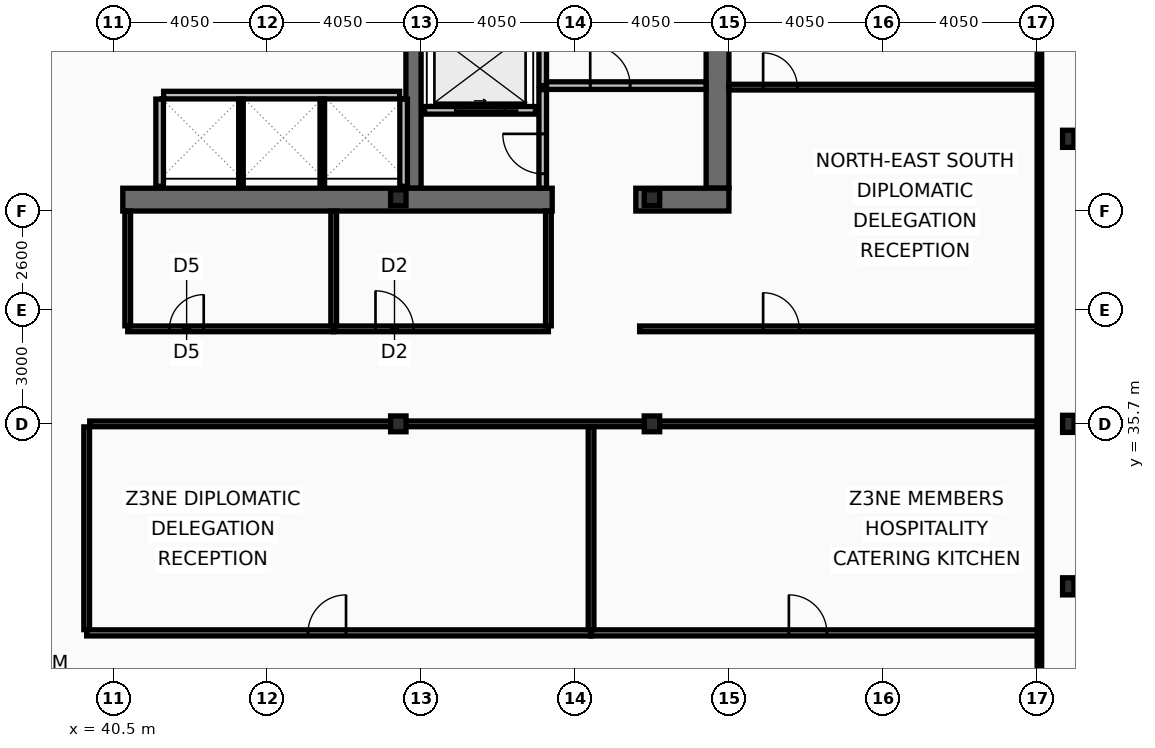
"""IFC4 building model, lengths in metres.
Left out: names, types, materials, properties, quantities, classifications, styles, units other than length and angle.
Written with IfcOpenShell. Run it as: python <this file> out.ifc"""

import sys

from ifc_helpers import new_model, si_unit, direction, frame, frame_2d, origin, origin_2d, place, context, subcontext, project, spatial, rectangle, i_section, extrude, element, fill, save


model = new_model("IFC4")
c1 = context("Model", 3, precision=1e-05, world=origin(), true_north=direction((0.0, 1.0)))
c2 = subcontext(c1, "Body", "Model", "MODEL_VIEW")
j1 = project(units=[si_unit("LENGTHUNIT", "METRE"), si_unit("PLANEANGLEUNIT", "RADIAN")], contexts=[c1])
p1 = place(None, origin())
s1 = spatial("IfcSite", under=j1, at=p1, CompositionType="ELEMENT")
p2 = place(p1, origin())
s2 = spatial("IfcBuilding", under=s1, at=p2, CompositionType="ELEMENT")
p3 = place(p2, frame((0.0, 0.0, 206.6)))
s3 = spatial("IfcBuildingStorey", under=s2, at=p3, CompositionType="ELEMENT", Elevation=206.6)
p4 = place(p3, frame((56.4, 53.1, 0.0), z_axis=(0.0, 0.0, 1.0), x_axis=(0.0, -1.0, 0.0)))
e1 = element("IfcWall", 1, at=p4, inside=s3, PredefinedType="SHEAR", context=c2, shape_type="SweptSolid", body=[
    extrude(rectangle(XDim=11.2, YDim=0.6, at=frame_2d((5.6, 0.0))), origin(), (0.0, 0.0, 1.0), 3.44),
])
p5 = place(p3, frame((48.4, 41.9, 0.0), z_axis=(0.0, 0.0, 1.0), x_axis=(0.0, 1.0, 0.0)))
e2 = element("IfcWall", 2, at=p5, inside=s3, PredefinedType="SHEAR", context=c2, shape_type="SweptSolid", body=[
    extrude(rectangle(XDim=11.2, YDim=0.4, at=frame_2d((5.6, 0.0))), origin(), (0.0, 0.0, 1.0), 3.44),
])
p6 = place(p3, frame((52.05, 41.6, 0.0), z_axis=(0.0, 0.0, 1.0), x_axis=(-1.0, 0.0, 0.0)))
e3 = element("IfcWall", 3, at=p6, inside=s3, PredefinedType="SHEAR", context=c2, shape_type="SweptSolid", body=[
    extrude(rectangle(XDim=11.3, YDim=0.6, at=frame_2d((5.65, 0.0))), origin(), (0.0, 0.0, 1.0), 3.44),
])
p7 = place(p3, frame((56.7, 41.6, 0.0), z_axis=(0.0, 0.0, 1.0), x_axis=(-1.0, 0.0, 0.0)))
e4 = element("IfcWall", 4, at=p7, inside=s3, PredefinedType="SHEAR", context=c2, shape_type="SweptSolid", body=[
    extrude(rectangle(XDim=2.45, YDim=0.6, at=frame_2d((1.225, 0.0))), origin(), (0.0, 0.0, 1.0), 3.44),
])
for number, where, z_axis, x_axis in (
    (5, (65.63, 31.425, 0.0), (0.0, 0.0, 1.0), (1.0, 0.0, 0.0)),
    (6, (65.63, 35.7, 0.0), (0.0, 0.0, 1.0), (1.0, 0.0, 0.0)),
    (7, (65.63, 43.2, 0.0), (0.0, 0.0, 1.0), (1.0, 0.0, 0.0)),
):
    element("IfcColumn", number, at=place(p3, frame(where, z_axis=z_axis, x_axis=x_axis)), inside=s3, PredefinedType="COLUMN", context=c2, shape_type="SweptSolid", body=[
        extrude(i_section(OverallWidth=0.3, OverallDepth=0.45, WebThickness=0.014, FlangeThickness=0.026, at=origin_2d()), origin(), (0.0, 0.0, 1.0), 3.6),
    ])
for number, where, z_axis, x_axis in (
    (8, (48.0, 35.7, 0.0), (0.0, 0.0, 1.0), (1.0, 0.0, 0.0)),
    (9, (48.0, 41.65, 0.0), (0.0, 0.0, 1.0), (1.0, 0.0, 0.0)),
    (10, (54.675, 35.7, 0.0), (0.0, 0.0, 1.0), (1.0, 0.0, 0.0)),
    (11, (54.675, 41.65, 0.0), (0.0, 0.0, 1.0), (1.0, 0.0, 0.0)),
):
    element("IfcColumn", number, at=place(p3, frame(where, z_axis=z_axis, x_axis=x_axis)), inside=s3, PredefinedType="COLUMN", context=c2, shape_type="SweptSolid", body=[
        extrude(i_section(OverallWidth=0.406, OverallDepth=0.416, WebThickness=0.03, FlangeThickness=0.048, at=origin_2d()), origin(), (0.0, 0.0, 1.0), 3.6),
    ])
p8 = place(p3, frame((51.61, 43.95, 0.0), z_axis=(0.0, 0.0, 1.0), x_axis=(-1.0, 0.0, 0.0)))
e12 = element("IfcWall", 12, at=p8, inside=s3, PredefinedType="PARTITIONING", context=c2, shape_type="SweptSolid", body=[
    extrude(rectangle(XDim=2.92, YDim=0.2, at=frame_2d((1.46, 0.0))), origin(), (0.0, 0.0, 1.0), 3.44),
])
p9 = place(p8, frame((0.81, 0.0, 0.0)))
e13 = element("IfcOpeningElement", 13, at=p9, cuts=e12, PredefinedType="OPENING", context=c2, shape_type="SweptSolid", body=[
    extrude(rectangle(XDim=1.3, YDim=2.18, at=frame_2d((0.65, 1.09))), frame((0.0, 0.11, 0.0), z_axis=(0.0, -1.0, 0.0), x_axis=(1.0, 0.0, 0.0)), (0.0, 0.0, 1.0), 0.22),
])
p10 = place(p3, frame((51.8, 44.6, 0.0), z_axis=(0.0, 0.0, 1.0), x_axis=(0.0, 1.0, 0.0)))
e14 = element("IfcWall", 14, at=p10, inside=s3, PredefinedType="PARTITIONING", context=c2, shape_type="SweptSolid", body=[
    extrude(rectangle(XDim=4.3, YDim=0.2, at=frame_2d((2.15, 0.0))), origin(), (0.0, 0.0, 1.0), 3.44),
])
p11 = place(p3, frame((51.9, 44.6, 0.0), z_axis=(0.0, 0.0, 1.0), x_axis=(1.0, 0.0, 0.0)))
e15 = element("IfcWall", 15, at=p11, inside=s3, PredefinedType="PARTITIONING", context=c2, shape_type="SweptSolid", body=[
    extrude(rectangle(XDim=4.2, YDim=0.2, at=frame_2d((2.1, 0.0))), origin(), (0.0, 0.0, 1.0), 3.44),
])
p12 = place(p11, frame((1.15, 0.0, 0.0)))
e16 = element("IfcOpeningElement", 16, at=p12, cuts=e15, PredefinedType="OPENING", context=c2, shape_type="SweptSolid", body=[
    extrude(rectangle(XDim=1.05, YDim=2.15, at=frame_2d((0.525, 1.075))), frame((0.0, 0.11, 0.0), z_axis=(0.0, -1.0, 0.0), x_axis=(1.0, 0.0, 0.0)), (0.0, 0.0, 1.0), 0.22),
])
p13 = place(p3, frame((51.8, 41.9, 0.0), z_axis=(0.0, 0.0, 1.0), x_axis=(0.0, 1.0, 0.0)))
e17 = element("IfcWall", 17, at=p13, inside=s3, PredefinedType="PARTITIONING", context=c2, shape_type="SweptSolid", body=[
    extrude(rectangle(XDim=2.595, YDim=0.2, at=frame_2d((1.298, 0.0))), origin(), (0.0, 0.0, 1.0), 3.44),
])
p14 = place(p13, frame((0.38, 0.0, 0.0)))
e18 = element("IfcOpeningElement", 18, at=p14, cuts=e17, PredefinedType="OPENING", context=c2, shape_type="SweptSolid", body=[
    extrude(rectangle(XDim=1.05, YDim=2.15, at=frame_2d((0.525, 1.075))), frame((0.0, 0.11, 0.0), z_axis=(0.0, -1.0, 0.0), x_axis=(1.0, 0.0, 0.0)), (0.0, 0.0, 1.0), 0.22),
])
p15 = place(p3, frame((41.825, 44.35, 0.0), z_axis=(0.0, 0.0, 1.0), x_axis=(1.0, 0.0, 0.0)))
e19 = element("IfcWall", 19, at=p15, inside=s3, PredefinedType="PARTITIONING", context=c2, shape_type="SweptSolid", body=[
    extrude(rectangle(XDim=6.21, YDim=0.2, at=frame_2d((3.105, 0.0))), origin(), (0.0, 0.0, 1.0), 3.44),
])
for number, where, z_axis, x_axis in (
    (20, (41.72, 41.95, 0.0), (0.0, 0.0, 1.0), (0.0, 1.0, 0.0)),
    (21, (48.14, 41.95, 0.0), (0.0, 0.0, 1.0), (0.0, 1.0, 0.0)),
):
    element("IfcWall", number, at=place(p3, frame(where, z_axis=z_axis, x_axis=x_axis)), inside=s3, PredefinedType="PARTITIONING", context=c2, shape_type="SweptSolid", body=[
        extrude(rectangle(XDim=2.295, YDim=0.2, at=frame_2d((1.147, 0.0))), origin(), (0.0, 0.0, 1.0), 3.44),
    ])
for number, where, z_axis, x_axis in (
    (22, (43.86, 41.95, 0.0), (0.0, 0.0, 1.0), (0.0, 1.0, 0.0)),
    (23, (46.0, 41.95, 0.0), (0.0, 0.0, 1.0), (0.0, 1.0, 0.0)),
):
    element("IfcWall", number, at=place(p3, frame(where, z_axis=z_axis, x_axis=x_axis)), inside=s3, PredefinedType="PARTITIONING", context=c2, shape_type="SweptSolid", body=[
        extrude(rectangle(XDim=2.295, YDim=0.12, at=frame_2d((1.147, 0.0))), origin(), (0.0, 0.0, 1.0), 3.44),
    ])
p16 = place(p3, frame((40.88, 38.2, 0.0), z_axis=(0.0, 0.0, 1.0), x_axis=(1.0, 0.0, 0.0)))
e24 = element("IfcWall", 24, at=p16, inside=s3, PredefinedType="PARTITIONING", context=c2, shape_type="SweptSolid", body=[
    extrude(rectangle(XDim=5.42, YDim=0.15, at=frame_2d((2.71, 0.0))), origin(), (0.0, 0.0, 1.0), 2.73),
])
p17 = place(p16, frame((1.1, 0.0, 0.0)))
e25 = element("IfcOpeningElement", 25, at=p17, cuts=e24, PredefinedType="OPENING", context=c2, shape_type="SweptSolid", body=[
    extrude(rectangle(XDim=0.9, YDim=2.05, at=frame_2d((0.45, 1.025))), frame((0.0, 0.085, 0.0), z_axis=(0.0, -1.0, 0.0), x_axis=(1.0, 0.0, 0.0)), (0.0, 0.0, 1.0), 0.17),
])
p18 = place(p3, frame((46.3, 38.2, 0.0), z_axis=(0.0, 0.0, 1.0), x_axis=(1.0, 0.0, 0.0)))
e26 = element("IfcWall", 26, at=p18, inside=s3, PredefinedType="PARTITIONING", context=c2, shape_type="SweptSolid", body=[
    extrude(rectangle(XDim=5.65, YDim=0.15, at=frame_2d((2.825, 0.0))), origin(), (0.0, 0.0, 1.0), 2.73),
])
p19 = place(p18, frame((1.1, 0.0, 0.0)))
e27 = element("IfcOpeningElement", 27, at=p19, cuts=e26, PredefinedType="OPENING", context=c2, shape_type="SweptSolid", body=[
    extrude(rectangle(XDim=1.0, YDim=2.05, at=frame_2d((0.5, 1.025))), frame((0.0, 0.085, 0.0), z_axis=(0.0, -1.0, 0.0), x_axis=(1.0, 0.0, 0.0)), (0.0, 0.0, 1.0), 0.17),
])
for number, where, z_axis, x_axis in (
    (28, (40.88, 38.28, 0.0), (0.0, 0.0, 1.0), (0.0, 1.0, 0.0)),
    (29, (46.3, 38.28, 0.0), (0.0, 0.0, 1.0), (0.0, 1.0, 0.0)),
    (30, (51.95, 38.28, 0.0), (0.0, 0.0, 1.0), (0.0, 1.0, 0.0)),
):
    element("IfcWall", number, at=place(p3, frame(where, z_axis=z_axis, x_axis=x_axis)), inside=s3, PredefinedType="PARTITIONING", context=c2, shape_type="SweptSolid", body=[
        extrude(rectangle(XDim=3.02, YDim=0.15, at=frame_2d((1.51, 0.0))), origin(), (0.0, 0.0, 1.0), 3.44),
    ])
p20 = place(p3, frame((54.35, 38.2, 0.0), z_axis=(0.0, 0.0, 1.0), x_axis=(1.0, 0.0, 0.0)))
e31 = element("IfcWall", 31, at=p20, inside=s3, PredefinedType="PARTITIONING", context=c2, shape_type="SweptSolid", body=[
    extrude(rectangle(XDim=10.52, YDim=0.15, at=frame_2d((5.26, 0.0))), origin(), (0.0, 0.0, 1.0), 2.73),
])
p21 = place(p20, frame((3.25, 0.0, 0.0)))
e32 = element("IfcOpeningElement", 32, at=p21, cuts=e31, PredefinedType="OPENING", context=c2, shape_type="SweptSolid", body=[
    extrude(rectangle(XDim=0.95, YDim=2.05, at=frame_2d((0.475, 1.025))), frame((0.0, 0.085, 0.0), z_axis=(0.0, -1.0, 0.0), x_axis=(1.0, 0.0, 0.0)), (0.0, 0.0, 1.0), 0.17),
])
p22 = place(p3, frame((56.7, 44.56, 0.0), z_axis=(0.0, 0.0, 1.0), x_axis=(1.0, 0.0, 0.0)))
e33 = element("IfcWall", 33, at=p22, inside=s3, PredefinedType="PARTITIONING", context=c2, shape_type="SweptSolid", body=[
    extrude(rectangle(XDim=8.105, YDim=0.15, at=frame_2d((4.052, 0.0))), origin(), (0.0, 0.0, 1.0), 2.83),
])
p23 = place(p22, frame((0.9, 0.0, 0.0)))
e34 = element("IfcOpeningElement", 34, at=p23, cuts=e33, PredefinedType="OPENING", context=c2, shape_type="SweptSolid", body=[
    extrude(rectangle(XDim=0.9, YDim=2.05, at=frame_2d((0.45, 1.025))), frame((0.0, 0.085, 0.0), z_axis=(0.0, -1.0, 0.0), x_axis=(1.0, 0.0, 0.0)), (0.0, 0.0, 1.0), 0.17),
])
p24 = place(p3, frame((39.8, 30.285, 0.0), z_axis=(0.0, 0.0, 1.0), x_axis=(0.0, 1.0, 0.0)))
e35 = element("IfcWall", 35, at=p24, inside=s3, PredefinedType="PARTITIONING", context=c2, shape_type="SweptSolid", body=[
    extrude(rectangle(XDim=5.335, YDim=0.15, at=frame_2d((2.667, 0.0))), origin(), (0.0, 0.0, 1.0), 2.98),
])
p25 = place(p3, frame((39.88, 35.7, 0.0), z_axis=(0.0, 0.0, 1.0), x_axis=(1.0, 0.0, 0.0)))
e36 = element("IfcWall", 36, at=p25, inside=s3, PredefinedType="PARTITIONING", context=c2, shape_type="SweptSolid", body=[
    extrude(rectangle(XDim=24.925, YDim=0.15, at=frame_2d((12.462, 0.0))), origin(), (0.0, 0.0, 1.0), 2.73),
])
p26 = place(p3, frame((39.8, 30.2, 0.0), z_axis=(0.0, 0.0, 1.0), x_axis=(1.0, 0.0, 0.0)))
e37 = element("IfcWall", 37, at=p26, inside=s3, PredefinedType="PARTITIONING", context=c2, shape_type="SweptSolid", body=[
    extrude(rectangle(XDim=13.272, YDim=0.16, at=frame_2d((6.636, 0.0))), origin(), (0.0, 0.0, 1.0), 2.73),
])
p27 = place(p26, frame((5.824, 0.0, 0.0)))
e38 = element("IfcOpeningElement", 38, at=p27, cuts=e37, PredefinedType="OPENING", context=c2, shape_type="SweptSolid", body=[
    extrude(rectangle(XDim=1.0, YDim=2.05, at=frame_2d((0.5, 1.025))), frame((0.0, 0.09, 0.0), z_axis=(0.0, -1.0, 0.0), x_axis=(1.0, 0.0, 0.0)), (0.0, 0.0, 1.0), 0.18),
])
p28 = place(p3, frame((53.073, 30.2, 0.0), z_axis=(0.0, 0.0, 1.0), x_axis=(1.0, 0.0, 0.0)))
e39 = element("IfcWall", 39, at=p28, inside=s3, PredefinedType="PARTITIONING", context=c2, shape_type="SweptSolid", body=[
    extrude(rectangle(XDim=11.798, YDim=0.16, at=frame_2d((5.899, 0.0))), origin(), (0.0, 0.0, 1.0), 2.73),
])
p29 = place(p28, frame((5.205, 0.0, 0.0)))
e40 = element("IfcOpeningElement", 40, at=p29, cuts=e39, PredefinedType="OPENING", context=c2, shape_type="SweptSolid", body=[
    extrude(rectangle(XDim=1.0, YDim=2.05, at=frame_2d((0.5, 1.025))), frame((0.0, 0.09, 0.0), z_axis=(0.0, -1.0, 0.0), x_axis=(1.0, 0.0, 0.0)), (0.0, 0.0, 1.0), 0.18),
])
p30 = place(p3, frame((53.073, 30.285, 0.0), z_axis=(0.0, 0.0, 1.0), x_axis=(0.0, 1.0, 0.0)))
e41 = element("IfcWall", 41, at=p30, inside=s3, PredefinedType="PARTITIONING", context=c2, shape_type="SweptSolid", body=[
    extrude(rectangle(XDim=5.335, YDim=0.15, at=frame_2d((2.667, 0.0))), origin(), (0.0, 0.0, 1.0), 2.98),
])
p31 = place(p3, frame((64.87, 10.665, 0.0), z_axis=(0.0, 0.0, 1.0), x_axis=(0.0, 1.0, 0.0)))
e42 = element("IfcWall", 42, at=p31, inside=s3, PredefinedType="PARTITIONING", context=c2, shape_type="SweptSolid", body=[
    extrude(rectangle(XDim=42.11, YDim=0.12, at=frame_2d((21.055, 0.0))), origin(), (0.0, 0.0, 1.0), 2.73),
])
p32 = place(p9, origin())
e43 = element("IfcDoor", 43, at=p32, inside=s3, OperationType="SLIDING_TO_LEFT", PredefinedType="DOOR", context=c2, shape_type="SweptSolid", body=[
    extrude(rectangle(XDim=1.3, YDim=2.18, at=frame_2d((0.65, 1.09))), frame((0.0, 0.025, 0.0), z_axis=(0.0, -1.0, 0.0), x_axis=(1.0, 0.0, 0.0)), (0.0, 0.0, 1.0), 0.05),
])
fill(e13, e43)
p33 = place(p12, origin())
e44 = element("IfcDoor", 44, at=p33, inside=s3, OperationType="SINGLE_SWING_LEFT", PredefinedType="DOOR", context=c2, shape_type="SweptSolid", body=[
    extrude(rectangle(XDim=1.05, YDim=2.15, at=frame_2d((0.525, 1.075))), frame((0.0, 0.025, 0.0), z_axis=(0.0, -1.0, 0.0), x_axis=(1.0, 0.0, 0.0)), (0.0, 0.0, 1.0), 0.05),
])
fill(e16, e44)
p34 = place(p14, origin())
e45 = element("IfcDoor", 45, at=p34, inside=s3, OperationType="SINGLE_SWING_RIGHT", PredefinedType="DOOR", context=c2, shape_type="SweptSolid", body=[
    extrude(rectangle(XDim=1.05, YDim=2.15, at=frame_2d((0.525, 1.075))), frame((0.0, 0.025, 0.0), z_axis=(0.0, -1.0, 0.0), x_axis=(1.0, 0.0, 0.0)), (0.0, 0.0, 1.0), 0.05),
])
fill(e18, e45)
p35 = place(p17, origin())
e46 = element("IfcDoor", 46, at=p35, inside=s3, OperationType="SINGLE_SWING_RIGHT", PredefinedType="DOOR", context=c2, shape_type="SweptSolid", body=[
    extrude(rectangle(XDim=0.9, YDim=2.05, at=frame_2d((0.45, 1.025))), frame((0.0, 0.025, 0.0), z_axis=(0.0, -1.0, 0.0), x_axis=(1.0, 0.0, 0.0)), (0.0, 0.0, 1.0), 0.05),
])
fill(e25, e46)
p36 = place(p19, origin())
e47 = element("IfcDoor", 47, at=p36, inside=s3, OperationType="SINGLE_SWING_LEFT", PredefinedType="DOOR", context=c2, shape_type="SweptSolid", body=[
    extrude(rectangle(XDim=1.0, YDim=2.05, at=frame_2d((0.5, 1.025))), frame((0.0, 0.025, 0.0), z_axis=(0.0, -1.0, 0.0), x_axis=(1.0, 0.0, 0.0)), (0.0, 0.0, 1.0), 0.05),
])
fill(e27, e47)
p37 = place(p21, origin())
e48 = element("IfcDoor", 48, at=p37, inside=s3, OperationType="SINGLE_SWING_LEFT", PredefinedType="DOOR", context=c2, shape_type="SweptSolid", body=[
    extrude(rectangle(XDim=0.95, YDim=2.05, at=frame_2d((0.475, 1.025))), frame((0.0, 0.025, 0.0), z_axis=(0.0, -1.0, 0.0), x_axis=(1.0, 0.0, 0.0)), (0.0, 0.0, 1.0), 0.05),
])
fill(e32, e48)
p38 = place(p23, origin())
e49 = element("IfcDoor", 49, at=p38, inside=s3, OperationType="SINGLE_SWING_LEFT", PredefinedType="DOOR", context=c2, shape_type="SweptSolid", body=[
    extrude(rectangle(XDim=0.9, YDim=2.05, at=frame_2d((0.45, 1.025))), frame((0.0, 0.025, 0.0), z_axis=(0.0, -1.0, 0.0), x_axis=(1.0, 0.0, 0.0)), (0.0, 0.0, 1.0), 0.05),
])
fill(e34, e49)
p39 = place(p27, origin())
e50 = element("IfcDoor", 50, at=p39, inside=s3, OperationType="SINGLE_SWING_RIGHT", PredefinedType="DOOR", context=c2, shape_type="SweptSolid", body=[
    extrude(rectangle(XDim=1.0, YDim=2.05, at=frame_2d((0.5, 1.025))), frame((0.0, 0.025, 0.0), z_axis=(0.0, -1.0, 0.0), x_axis=(1.0, 0.0, 0.0)), (0.0, 0.0, 1.0), 0.05),
])
fill(e38, e50)
p40 = place(p29, origin())
e51 = element("IfcDoor", 51, at=p40, inside=s3, OperationType="SINGLE_SWING_LEFT", PredefinedType="DOOR", context=c2, shape_type="SweptSolid", body=[
    extrude(rectangle(XDim=1.0, YDim=2.05, at=frame_2d((0.5, 1.025))), frame((0.0, 0.025, 0.0), z_axis=(0.0, -1.0, 0.0), x_axis=(1.0, 0.0, 0.0)), (0.0, 0.0, 1.0), 0.05),
])
fill(e40, e51)
save(model, sys.argv[1])
